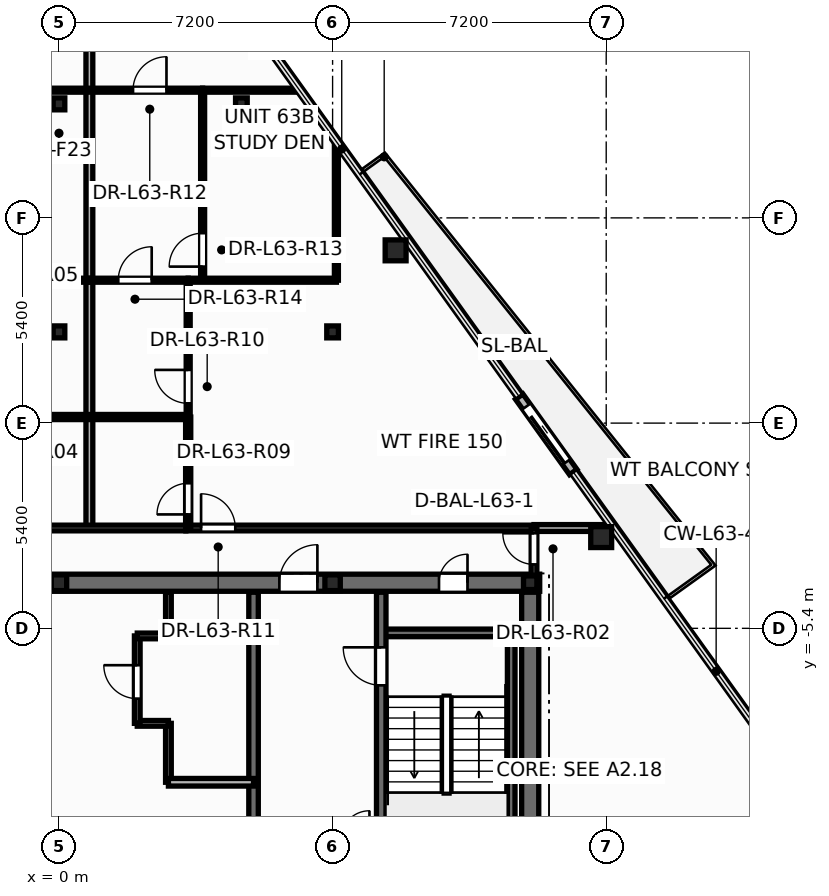
"""IFC4 building model, lengths in metres.
Left out: names, types, materials, properties, quantities, classifications, styles, units other than length and angle.
Written with IfcOpenShell. Run it as: python <this file> out.ifc"""

import sys

from ifc_helpers import new_model, si_unit, direction, frame, frame_2d, origin, origin_2d, place, context, subcontext, project, spatial, rectangle, hollow_circle, i_section, extrude, element, fill, save


model = new_model("IFC4")
c1 = context("Model", 3, precision=1e-05, world=origin(), true_north=direction((0.0, 1.0)))
c2 = subcontext(c1, "Body", "Model", "MODEL_VIEW")
j1 = project(units=[si_unit("LENGTHUNIT", "METRE"), si_unit("PLANEANGLEUNIT", "RADIAN")], contexts=[c1])
p1 = place(None, origin())
s1 = spatial("IfcSite", under=j1, at=p1, CompositionType="ELEMENT")
p2 = place(p1, origin())
s2 = spatial("IfcBuilding", under=s1, at=p2, CompositionType="ELEMENT")
p3 = place(p2, frame((0.0, 0.0, 240.6)))
s3 = spatial("IfcBuildingStorey", under=s2, at=p3, CompositionType="ELEMENT", Elevation=240.6)
for number, where, z_axis, x_axis in (
    (1, (14.268, -2.999, 0.0), (0.0, 0.0, 1.0), (1.0, 0.0, 0.0)),
    (2, (8.858, 4.546, 0.0), (0.0, 0.0, 1.0), (1.0, 0.0, 0.0)),
):
    element("IfcColumn", number, at=place(p3, frame(where, z_axis=z_axis, x_axis=x_axis)), inside=s3, PredefinedType="COLUMN", context=c2, shape_type="SweptSolid", body=[
        extrude(hollow_circle(Radius=0.275, WallThickness=0.024, at=origin_2d()), origin(), (0.0, 0.0, 1.0), 3.6),
    ])
p4 = place(p3, frame((12.4, -4.2, 0.0), z_axis=(0.0, 0.0, 1.0), x_axis=(1.0, 0.0, 0.0)))
e3 = element("IfcColumn", 3, at=p4, inside=s3, PredefinedType="COLUMN", context=c2, shape_type="SweptSolid", body=[
    extrude(i_section(OverallWidth=0.352, OverallDepth=0.359, WebThickness=0.018, FlangeThickness=0.026, at=origin_2d()), origin(), (0.0, 0.0, 1.0), 3.6),
])
for number, where, z_axis, x_axis in (
    (4, (0.0, -4.2, 0.0), (0.0, 0.0, 1.0), (1.0, 0.0, 0.0)),
    (5, (7.2, -4.2, 0.0), (0.0, 0.0, 1.0), (1.0, 0.0, 0.0)),
):
    element("IfcColumn", number, at=place(p3, frame(where, z_axis=z_axis, x_axis=x_axis)), inside=s3, PredefinedType="PILASTER", context=c2, shape_type="SweptSolid", body=[
        extrude(i_section(OverallWidth=0.405, OverallDepth=0.414, WebThickness=0.022, FlangeThickness=0.032, at=origin_2d()), origin(), (0.0, 0.0, 1.0), 3.6),
    ])
for number, where, z_axis, x_axis in (
    (6, (0.0, 2.4, 0.0), (0.0, 0.0, 1.0), (1.0, 0.0, 0.0)),
    (7, (7.2, 2.4, 0.0), (0.0, 0.0, 1.0), (1.0, 0.0, 0.0)),
    (8, (0.0, 8.4, 0.0), (0.0, 0.0, 1.0), (1.0, 0.0, 0.0)),
    (9, (4.8, 8.4, 0.0), (0.0, 0.0, 1.0), (1.0, 0.0, 0.0)),
):
    element("IfcColumn", number, at=place(p3, frame(where, z_axis=z_axis, x_axis=x_axis)), inside=s3, PredefinedType="COLUMN", context=c2, shape_type="SweptSolid", body=[
        extrude(i_section(OverallWidth=0.307, OverallDepth=0.314, WebThickness=0.012, FlangeThickness=0.019, at=origin_2d()), origin(), (0.0, 0.0, 1.0), 3.6),
    ])
p5 = place(p3, frame((13.532, -1.287, -0.015), z_axis=(0.0, 0.0, 1.0), x_axis=(-0.582666574714, 0.812711303423, 0.0)))
e10 = element("IfcWall", 10, at=p5, inside=s3, PredefinedType="STANDARD", context=c2, shape_type="SweptSolid", body=[
    extrude(rectangle(XDim=2.44, YDim=0.24, at=frame_2d((1.22, 0.0))), origin(), (0.0, 0.0, 1.0), 2.813),
])
p6 = place(p5, frame((0.32, 0.0, 0.015)))
e11 = element("IfcOpeningElement", 11, at=p6, cuts=e10, PredefinedType="OPENING", context=c2, shape_type="SweptSolid", body=[
    extrude(rectangle(XDim=1.806, YDim=2.204, at=frame_2d((0.9, 1.102))), frame((0.0, 0.13, 0.0), z_axis=(0.0, -1.0, 0.0), x_axis=(1.0, 0.0, 0.0)), (0.0, 0.0, 1.0), 0.26),
])
p7 = place(p3, frame((2.88, -9.45, 0.0), z_axis=(0.0, 0.0, 1.0), x_axis=(0.0, 1.0, 0.0)))
e12 = element("IfcWall", 12, at=p7, inside=s3, PredefinedType="PARTITIONING", context=c2, shape_type="SweptSolid", body=[
    extrude(rectangle(XDim=1.55, YDim=0.15, at=frame_2d((0.775, 0.0))), origin(), (0.0, 0.0, 1.0), 3.28),
])
p8 = place(p3, frame((2.06, -7.9, 0.0), z_axis=(0.0, 0.0, 1.0), x_axis=(1.0, 0.0, 0.0)))
e13 = element("IfcWall", 13, at=p8, inside=s3, PredefinedType="PARTITIONING", context=c2, shape_type="SweptSolid", body=[
    extrude(rectangle(XDim=0.82, YDim=0.15, at=frame_2d((0.41, 0.0))), origin(), (0.0, 0.0, 1.0), 3.28),
])
p9 = place(p3, frame((2.06, -7.9, 0.0), z_axis=(0.0, 0.0, 1.0), x_axis=(0.0, 1.0, 0.0)))
e14 = element("IfcWall", 14, at=p9, inside=s3, PredefinedType="PARTITIONING", context=c2, shape_type="SweptSolid", body=[
    extrude(rectangle(XDim=2.3, YDim=0.15, at=frame_2d((1.15, 0.0))), origin(), (0.0, 0.0, 1.0), 3.28),
])
p10 = place(p9, frame((0.65, 0.0, 0.0)))
e15 = element("IfcOpeningElement", 15, at=p10, cuts=e14, PredefinedType="OPENING", context=c2, shape_type="SweptSolid", body=[
    extrude(rectangle(XDim=0.886, YDim=2.104, at=frame_2d((0.44, 1.052))), frame((0.0, 0.085, 0.0), z_axis=(0.0, -1.0, 0.0), x_axis=(1.0, 0.0, 0.0)), (0.0, 0.0, 1.0), 0.17),
])
p11 = place(p3, frame((2.06, -5.6, 0.0), z_axis=(0.0, 0.0, 1.0), x_axis=(1.0, 0.0, 0.0)))
e16 = element("IfcWall", 16, at=p11, inside=s3, PredefinedType="PARTITIONING", context=c2, shape_type="SweptSolid", body=[
    extrude(rectangle(XDim=0.82, YDim=0.15, at=frame_2d((0.41, 0.0))), origin(), (0.0, 0.0, 1.0), 3.28),
])
p12 = place(p3, frame((2.88, -5.6, 0.0), z_axis=(0.0, 0.0, 1.0), x_axis=(0.0, 1.0, 0.0)))
e17 = element("IfcWall", 17, at=p12, inside=s3, PredefinedType="PARTITIONING", context=c2, shape_type="SweptSolid", body=[
    extrude(rectangle(XDim=1.15, YDim=0.15, at=frame_2d((0.575, 0.0))), origin(), (0.0, 0.0, 1.0), 3.28),
])
p13 = place(p3, frame((-12.65, -4.2, 0.0), z_axis=(0.0, 0.0, 1.0), x_axis=(1.0, 0.0, 0.0)))
e18 = element("IfcWall", 18, at=p13, inside=s3, PredefinedType="SHEAR", context=c2, shape_type="SweptSolid", body=[
    extrude(rectangle(XDim=25.3, YDim=0.45, at=frame_2d((12.65, 0.0))), origin(), (0.0, 0.0, 1.0), 3.6),
])
p14 = place(p13, frame((1.85, 0.0, 0.0)))
e19 = element("IfcOpeningElement", 19, at=p14, cuts=e18, PredefinedType="OPENING", context=c2, shape_type="SweptSolid", body=[
    extrude(rectangle(XDim=0.756, YDim=2.054, at=frame_2d((0.375, 1.027))), frame((0.0, 0.235, 0.0), z_axis=(0.0, -1.0, 0.0), x_axis=(1.0, 0.0, 0.0)), (0.0, 0.0, 1.0), 0.47),
])
p15 = place(p13, frame((22.65, 0.0, 0.0)))
e20 = element("IfcOpeningElement", 20, at=p15, cuts=e18, PredefinedType="OPENING", context=c2, shape_type="SweptSolid", body=[
    extrude(rectangle(XDim=0.756, YDim=2.054, at=frame_2d((0.375, 1.027))), frame((0.0, 0.235, 0.0), z_axis=(0.0, -1.0, 0.0), x_axis=(1.0, 0.0, 0.0)), (0.0, 0.0, 1.0), 0.47),
])
p16 = place(p13, frame((5.85, 0.0, 0.0)))
e21 = element("IfcOpeningElement", 21, at=p16, cuts=e18, PredefinedType="OPENING", context=c2, shape_type="SweptSolid", body=[
    extrude(rectangle(XDim=1.006, YDim=2.104, at=frame_2d((0.5, 1.052))), frame((0.0, 0.235, 0.0), z_axis=(0.0, -1.0, 0.0), x_axis=(1.0, 0.0, 0.0)), (0.0, 0.0, 1.0), 0.47),
])
p17 = place(p13, frame((10.35, 0.0, 0.0)))
e22 = element("IfcOpeningElement", 22, at=p17, cuts=e18, PredefinedType="OPENING", context=c2, shape_type="SweptSolid", body=[
    extrude(rectangle(XDim=1.406, YDim=2.154, at=frame_2d((0.7, 1.077))), frame((0.0, 0.235, 0.0), z_axis=(0.0, -1.0, 0.0), x_axis=(1.0, 0.0, 0.0)), (0.0, 0.0, 1.0), 0.47),
])
p18 = place(p13, frame((18.45, 0.0, 0.0)))
e23 = element("IfcOpeningElement", 23, at=p18, cuts=e18, PredefinedType="OPENING", context=c2, shape_type="SweptSolid", body=[
    extrude(rectangle(XDim=1.006, YDim=2.104, at=frame_2d((0.5, 1.052))), frame((0.0, 0.235, 0.0), z_axis=(0.0, -1.0, 0.0), x_axis=(1.0, 0.0, 0.0)), (0.0, 0.0, 1.0), 0.47),
])
p19 = place(p3, frame((8.48, -5.52, 0.0), z_axis=(0.0, 0.0, 1.0), x_axis=(1.0, 0.0, 0.0)))
e24 = element("IfcWall", 24, at=p19, inside=s3, PredefinedType="SOLIDWALL", context=c2, shape_type="SweptSolid", body=[
    extrude(rectangle(XDim=3.87, YDim=0.2, at=frame_2d((1.935, 0.0))), origin(), (0.0, 0.0, 1.0), 3.6),
])
p20 = place(p3, frame((11.9, -13.1, 0.0), z_axis=(0.0, 0.0, 1.0), x_axis=(0.0, 1.0, 0.0)))
e25 = element("IfcWall", 25, at=p20, inside=s3, PredefinedType="SOLIDWALL", context=c2, shape_type="SweptSolid", body=[
    extrude(rectangle(XDim=7.58, YDim=0.2, at=frame_2d((3.79, 0.0))), origin(), (0.0, 0.0, 1.0), 3.6),
])
p21 = place(p3, frame((8.48, -13.85, 0.0), z_axis=(0.0, 0.0, 1.0), x_axis=(0.0, 1.0, 0.0)))
e26 = element("IfcWall", 26, at=p21, inside=s3, PredefinedType="SHEAR", context=c2, shape_type="SweptSolid", body=[
    extrude(rectangle(XDim=9.4, YDim=0.25, at=frame_2d((4.7, 0.0))), origin(), (0.0, 0.0, 1.0), 3.6),
])
p22 = place(p21, frame((6.95, 0.0, 0.0)))
e27 = element("IfcOpeningElement", 27, at=p22, cuts=e26, PredefinedType="OPENING", context=c2, shape_type="SweptSolid", body=[
    extrude(rectangle(XDim=1.006, YDim=2.104, at=frame_2d((0.5, 1.052))), frame((0.0, 0.135, 0.0), z_axis=(0.0, -1.0, 0.0), x_axis=(1.0, 0.0, 0.0)), (0.0, 0.0, 1.0), 0.27),
])
p23 = place(p3, frame((5.12, -13.85, 0.0), z_axis=(0.0, 0.0, 1.0), x_axis=(0.0, 1.0, 0.0)))
e28 = element("IfcWall", 28, at=p23, inside=s3, PredefinedType="SHEAR", context=c2, shape_type="SweptSolid", body=[
    extrude(rectangle(XDim=9.4, YDim=0.25, at=frame_2d((4.7, 0.0))), origin(), (0.0, 0.0, 1.0), 3.6),
])
p24 = place(p3, frame((12.4, -13.85, 0.0), z_axis=(0.0, 0.0, 1.0), x_axis=(0.0, 1.0, 0.0)))
e29 = element("IfcWall", 29, at=p24, inside=s3, PredefinedType="SHEAR", context=c2, shape_type="SweptSolid", body=[
    extrude(rectangle(XDim=9.4, YDim=0.45, at=frame_2d((4.7, 0.0))), origin(), (0.0, 0.0, 1.0), 3.6),
])
p25 = place(p3, frame((2.88, -9.45, 0.0), z_axis=(0.0, 0.0, 1.0), x_axis=(1.0, 0.0, 0.0)))
e30 = element("IfcWall", 30, at=p25, inside=s3, PredefinedType="SOLIDWALL", context=c2, shape_type="SweptSolid", body=[
    extrude(rectangle(XDim=2.24, YDim=0.2, at=frame_2d((1.12, 0.0))), origin(), (0.0, 0.0, 1.0), 3.28),
])
p26 = place(p3, frame((3.34, -2.76, 0.0), z_axis=(0.0, 0.0, 1.0), x_axis=(1.0, 0.0, 0.0)))
e31 = element("IfcWall", 31, at=p26, inside=s3, PredefinedType="PARTITIONING", context=c2, shape_type="SweptSolid", body=[
    extrude(rectangle(XDim=9.16, YDim=0.15, at=frame_2d((4.58, 0.0))), origin(), (0.0, 0.0, 1.0), 2.255),
])
p27 = place(p26, frame((0.399, 0.0, 0.0)))
e32 = element("IfcOpeningElement", 32, at=p27, cuts=e31, PredefinedType="OPENING", context=c2, shape_type="SweptSolid", body=[
    extrude(rectangle(XDim=0.906, YDim=2.104, at=frame_2d((0.45, 1.052))), frame((0.0, 0.085, 0.0), z_axis=(0.0, -1.0, 0.0), x_axis=(1.0, 0.0, 0.0)), (0.0, 0.0, 1.0), 0.17),
])
p28 = place(p3, frame((-6.329, 8.76, 0.0), z_axis=(0.0, 0.0, 1.0), x_axis=(1.0, 0.0, 0.0)))
e33 = element("IfcWall", 33, at=p28, inside=s3, PredefinedType="PARTITIONING", context=c2, shape_type="SweptSolid", body=[
    extrude(rectangle(XDim=7.129, YDim=0.105, at=frame_2d((3.565, 0.0))), origin(), (0.0, 0.0, 1.0), 2.653),
])
p29 = place(p28, frame((3.49, 0.0, 0.0)))
e34 = element("IfcOpeningElement", 34, at=p29, cuts=e33, PredefinedType="OPENING", context=c2, shape_type="SweptSolid", body=[
    extrude(rectangle(XDim=0.886, YDim=2.104, at=frame_2d((0.44, 1.052))), frame((0.0, 0.062, 0.0), z_axis=(0.0, -1.0, 0.0), x_axis=(1.0, 0.0, 0.0)), (0.0, 0.0, 1.0), 0.125),
])
p30 = place(p3, frame((0.8, -2.76, 0.0), z_axis=(0.0, 0.0, 1.0), x_axis=(0.0, 1.0, 0.0)))
e35 = element("IfcWall", 35, at=p30, inside=s3, PredefinedType="PARTITIONING", context=c2, shape_type="SweptSolid", body=[
    extrude(rectangle(XDim=16.509, YDim=0.18, at=frame_2d((8.254, 0.0))), origin(), (0.0, 0.0, 1.0), 2.255),
])
p31 = place(p3, frame((3.78, 3.76, 0.0), z_axis=(0.0, 0.0, 1.0), x_axis=(0.0, 1.0, 0.0)))
e36 = element("IfcWall", 36, at=p31, inside=s3, PredefinedType="PARTITIONING", context=c2, shape_type="SweptSolid", body=[
    extrude(rectangle(XDim=5.0, YDim=0.105, at=frame_2d((2.5, 0.0))), origin(), (0.0, 0.0, 1.0), 2.653),
])
p32 = place(p31, frame((0.358, 0.0, 0.0)))
e37 = element("IfcOpeningElement", 37, at=p32, cuts=e36, PredefinedType="OPENING", context=c2, shape_type="SweptSolid", body=[
    extrude(rectangle(XDim=0.886, YDim=2.104, at=frame_2d((0.44, 1.052))), frame((0.0, 0.062, 0.0), z_axis=(0.0, -1.0, 0.0), x_axis=(1.0, 0.0, 0.0)), (0.0, 0.0, 1.0), 0.125),
])
p33 = place(p3, frame((7.3, 3.76, 0.0), z_axis=(0.0, 0.0, 1.0), x_axis=(0.0, 1.0, 0.0)))
e38 = element("IfcWall", 38, at=p33, inside=s3, PredefinedType="PARTITIONING", context=c2, shape_type="SweptSolid", body=[
    extrude(rectangle(XDim=3.646, YDim=0.105, at=frame_2d((1.823, 0.0))), origin(), (0.0, 0.0, 1.0), 2.653),
])
p34 = place(p3, frame((3.4, 0.16, 0.0), z_axis=(0.0, 0.0, 1.0), x_axis=(0.0, 1.0, 0.0)))
e39 = element("IfcWall", 39, at=p34, inside=s3, PredefinedType="PARTITIONING", context=c2, shape_type="SweptSolid", body=[
    extrude(rectangle(XDim=3.6, YDim=0.105, at=frame_2d((1.8, 0.0))), origin(), (0.0, 0.0, 1.0), 2.255),
])
p35 = place(p34, frame((0.36, 0.0, 0.0)))
e40 = element("IfcOpeningElement", 40, at=p35, cuts=e39, PredefinedType="OPENING", context=c2, shape_type="SweptSolid", body=[
    extrude(rectangle(XDim=0.886, YDim=2.104, at=frame_2d((0.44, 1.052))), frame((0.0, 0.062, 0.0), z_axis=(0.0, -1.0, 0.0), x_axis=(1.0, 0.0, 0.0)), (0.0, 0.0, 1.0), 0.125),
])
p36 = place(p3, frame((3.4, 3.76, 0.0), z_axis=(0.0, 0.0, 1.0), x_axis=(1.0, 0.0, 0.0)))
e41 = element("IfcWall", 41, at=p36, inside=s3, PredefinedType="PARTITIONING", context=c2, shape_type="SweptSolid", body=[
    extrude(rectangle(XDim=3.9, YDim=0.105, at=frame_2d((1.95, 0.0))), origin(), (0.0, 0.0, 1.0), 2.653),
])
p37 = place(p3, frame((0.8, 8.76, 0.0), z_axis=(0.0, 0.0, 1.0), x_axis=(1.0, 0.0, 0.0)))
e42 = element("IfcWall", 42, at=p37, inside=s3, PredefinedType="PARTITIONING", context=c2, shape_type="SweptSolid", body=[
    extrude(rectangle(XDim=2.98, YDim=0.105, at=frame_2d((1.49, 0.0))), origin(), (0.0, 0.0, 1.0), 3.28),
])
p38 = place(p37, frame((1.149, 0.0, 0.0)))
e43 = element("IfcOpeningElement", 43, at=p38, cuts=e42, PredefinedType="OPENING", context=c2, shape_type="SweptSolid", body=[
    extrude(rectangle(XDim=0.886, YDim=2.104, at=frame_2d((0.44, 1.052))), frame((0.0, 0.062, 0.0), z_axis=(0.0, -1.0, 0.0), x_axis=(1.0, 0.0, 0.0)), (0.0, 0.0, 1.0), 0.125),
])
p39 = place(p3, frame((3.4, -2.76, 0.0), z_axis=(0.0, 0.0, 1.0), x_axis=(0.0, 1.0, 0.0)))
e44 = element("IfcWall", 44, at=p39, inside=s3, PredefinedType="PARTITIONING", context=c2, shape_type="SweptSolid", body=[
    extrude(rectangle(XDim=2.92, YDim=0.135, at=frame_2d((1.46, 0.0))), origin(), (0.0, 0.0, 1.0), 3.28),
])
p40 = place(p39, frame((0.357, 0.0, 0.0)))
e45 = element("IfcOpeningElement", 45, at=p40, cuts=e44, PredefinedType="OPENING", context=c2, shape_type="SweptSolid", body=[
    extrude(rectangle(XDim=0.826, YDim=2.104, at=frame_2d((0.41, 1.052))), frame((0.0, 0.078, 0.0), z_axis=(0.0, -1.0, 0.0), x_axis=(1.0, 0.0, 0.0)), (0.0, 0.0, 1.0), 0.155),
])
p41 = place(p3, frame((-1.438, -2.76, 0.0), z_axis=(0.0, 0.0, 1.0), x_axis=(1.0, 0.0, 0.0)))
e46 = element("IfcWall", 46, at=p41, inside=s3, PredefinedType="PARTITIONING", context=c2, shape_type="SweptSolid", body=[
    extrude(rectangle(XDim=4.776, YDim=0.15, at=frame_2d((2.388, 0.0))), origin(), (0.0, 0.0, 1.0), 2.255),
])
p42 = place(p3, frame((-1.5, 0.16, 0.0), z_axis=(0.0, 0.0, 1.0), x_axis=(1.0, 0.0, 0.0)))
e47 = element("IfcWall", 47, at=p42, inside=s3, PredefinedType="PARTITIONING", context=c2, shape_type="SweptSolid", body=[
    extrude(rectangle(XDim=4.9, YDim=0.135, at=frame_2d((2.45, 0.0))), origin(), (0.0, 0.0, 1.0), 2.255),
])
p43 = place(p3, frame((0.8, 3.76, 0.0), z_axis=(0.0, 0.0, 1.0), x_axis=(1.0, 0.0, 0.0)))
e48 = element("IfcWall", 48, at=p43, inside=s3, PredefinedType="PARTITIONING", context=c2, shape_type="SweptSolid", body=[
    extrude(rectangle(XDim=2.6, YDim=0.105, at=frame_2d((1.3, 0.0))), origin(), (0.0, 0.0, 1.0), 2.899),
])
p44 = place(p43, frame((0.76, 0.0, 0.0)))
e49 = element("IfcOpeningElement", 49, at=p44, cuts=e48, PredefinedType="OPENING", context=c2, shape_type="SweptSolid", body=[
    extrude(rectangle(XDim=0.886, YDim=2.104, at=frame_2d((0.44, 1.052))), frame((0.0, 0.062, 0.0), z_axis=(0.0, -1.0, 0.0), x_axis=(1.0, 0.0, 0.0)), (0.0, 0.0, 1.0), 0.125),
])
p45 = place(p3, frame((3.78, 8.76, 0.0), z_axis=(0.0, 0.0, 1.0), x_axis=(1.0, 0.0, 0.0)))
e50 = element("IfcWall", 50, at=p45, inside=s3, PredefinedType="PARTITIONING", context=c2, shape_type="SweptSolid", body=[
    extrude(rectangle(XDim=2.549, YDim=0.105, at=frame_2d((1.275, 0.0))), origin(), (0.0, 0.0, 1.0), 2.653),
])
p46 = place(p3, frame((-1.5, 3.76, 0.0), z_axis=(0.0, 0.0, 1.0), x_axis=(1.0, 0.0, 0.0)))
e51 = element("IfcWall", 51, at=p46, inside=s3, PredefinedType="PARTITIONING", context=c2, shape_type="SweptSolid", body=[
    extrude(rectangle(XDim=2.3, YDim=0.105, at=frame_2d((1.15, 0.0))), origin(), (0.0, 0.0, 1.0), 2.255),
])
p47 = place(p3, frame((12.5, -2.76, 0.0), z_axis=(0.0, 0.0, 1.0), x_axis=(1.0, 0.0, 0.0)))
e52 = element("IfcWall", 52, at=p47, inside=s3, PredefinedType="PARTITIONING", context=c2, shape_type="SweptSolid", body=[
    extrude(rectangle(XDim=2.088, YDim=0.18, at=frame_2d((1.044, 0.0))), origin(), (0.0, 0.0, 1.0), 2.653),
])
p48 = place(p3, frame((12.5, -4.24, 0.0), z_axis=(0.0, 0.0, 1.0), x_axis=(0.0, 1.0, 0.0)))
e53 = element("IfcWall", 53, at=p48, inside=s3, PredefinedType="PARTITIONING", context=c2, shape_type="SweptSolid", body=[
    extrude(rectangle(XDim=1.48, YDim=0.15, at=frame_2d((0.74, 0.0))), origin(), (0.0, 0.0, 1.0), 2.255),
])
p49 = place(p48, frame((0.522, 0.0, 0.0)))
e54 = element("IfcOpeningElement", 54, at=p49, cuts=e53, PredefinedType="OPENING", context=c2, shape_type="SweptSolid", body=[
    extrude(rectangle(XDim=0.826, YDim=2.104, at=frame_2d((0.41, 1.052))), frame((0.0, 0.085, 0.0), z_axis=(0.0, -1.0, 0.0), x_axis=(1.0, 0.0, 0.0)), (0.0, 0.0, 1.0), 0.17),
])
p50 = place(p6, origin())
e55 = element("IfcDoor", 55, at=p50, inside=s3, OperationType="SLIDING_TO_LEFT", PredefinedType="DOOR", context=c2, shape_type="SweptSolid", body=[
    extrude(rectangle(XDim=1.8, YDim=2.2, at=frame_2d((0.9, 1.1))), frame((0.0, 0.025, 0.0), z_axis=(0.0, -1.0, 0.0), x_axis=(1.0, 0.0, 0.0)), (0.0, 0.0, 1.0), 0.05),
])
fill(e11, e55)
p51 = place(p10, origin())
e56 = element("IfcDoor", 56, at=p51, inside=s3, OperationType="SINGLE_SWING_RIGHT", PredefinedType="DOOR", context=c2, shape_type="SweptSolid", body=[
    extrude(rectangle(XDim=0.88, YDim=2.1, at=frame_2d((0.44, 1.05))), frame((0.0, 0.025, 0.0), z_axis=(0.0, -1.0, 0.0), x_axis=(1.0, 0.0, 0.0)), (0.0, 0.0, 1.0), 0.05),
])
fill(e15, e56)
p52 = place(p22, origin())
e57 = element("IfcDoor", 57, at=p52, inside=s3, OperationType="SINGLE_SWING_RIGHT", PredefinedType="DOOR", context=c2, shape_type="SweptSolid", body=[
    extrude(rectangle(XDim=1.0, YDim=2.1, at=frame_2d((0.5, 1.05))), frame((0.0, 0.025, 0.0), z_axis=(0.0, -1.0, 0.0), x_axis=(1.0, 0.0, 0.0)), (0.0, 0.0, 1.0), 0.05),
])
fill(e27, e57)
p53 = place(p15, origin())
e58 = element("IfcDoor", 58, at=p53, inside=s3, OperationType="SINGLE_SWING_RIGHT", PredefinedType="DOOR", context=c2, shape_type="SweptSolid", body=[
    extrude(rectangle(XDim=0.75, YDim=2.05, at=frame_2d((0.375, 1.025))), frame((0.0, 0.025, 0.0), z_axis=(0.0, -1.0, 0.0), x_axis=(1.0, 0.0, 0.0)), (0.0, 0.0, 1.0), 0.05),
])
fill(e20, e58)
p54 = place(p18, origin())
e59 = element("IfcDoor", 59, at=p54, inside=s3, OperationType="SINGLE_SWING_RIGHT", PredefinedType="DOOR", context=c2, shape_type="SweptSolid", body=[
    extrude(rectangle(XDim=1.0, YDim=2.1, at=frame_2d((0.5, 1.05))), frame((0.0, 0.025, 0.0), z_axis=(0.0, -1.0, 0.0), x_axis=(1.0, 0.0, 0.0)), (0.0, 0.0, 1.0), 0.05),
])
fill(e23, e59)
p55 = place(p49, origin())
e60 = element("IfcDoor", 60, at=p55, inside=s3, OperationType="SINGLE_SWING_RIGHT", PredefinedType="DOOR", context=c2, shape_type="SweptSolid", body=[
    extrude(rectangle(XDim=0.82, YDim=2.1, at=frame_2d((0.41, 1.05))), frame((0.0, 0.025, 0.0), z_axis=(0.0, -1.0, 0.0), x_axis=(1.0, 0.0, 0.0)), (0.0, 0.0, 1.0), 0.05),
])
fill(e54, e60)
p56 = place(p40, origin())
e61 = element("IfcDoor", 61, at=p56, inside=s3, OperationType="SINGLE_SWING_LEFT", PredefinedType="DOOR", context=c2, shape_type="SweptSolid", body=[
    extrude(rectangle(XDim=0.82, YDim=2.1, at=frame_2d((0.41, 1.05))), frame((0.0, 0.025, 0.0), z_axis=(0.0, -1.0, 0.0), x_axis=(1.0, 0.0, 0.0)), (0.0, 0.0, 1.0), 0.05),
])
fill(e45, e61)
p57 = place(p35, origin())
e62 = element("IfcDoor", 62, at=p57, inside=s3, OperationType="SINGLE_SWING_RIGHT", PredefinedType="DOOR", context=c2, shape_type="SweptSolid", body=[
    extrude(rectangle(XDim=0.88, YDim=2.1, at=frame_2d((0.44, 1.05))), frame((0.0, 0.025, 0.0), z_axis=(0.0, -1.0, 0.0), x_axis=(1.0, 0.0, 0.0)), (0.0, 0.0, 1.0), 0.05),
])
fill(e40, e62)
p58 = place(p27, origin())
e63 = element("IfcDoor", 63, at=p58, inside=s3, OperationType="SINGLE_SWING_LEFT", PredefinedType="DOOR", context=c2, shape_type="SweptSolid", body=[
    extrude(rectangle(XDim=0.9, YDim=2.1, at=frame_2d((0.45, 1.05))), frame((0.0, 0.025, 0.0), z_axis=(0.0, -1.0, 0.0), x_axis=(1.0, 0.0, 0.0)), (0.0, 0.0, 1.0), 0.05),
])
fill(e32, e63)
p59 = place(p38, origin())
e64 = element("IfcDoor", 64, at=p59, inside=s3, OperationType="SINGLE_SWING_RIGHT", PredefinedType="DOOR", context=c2, shape_type="SweptSolid", body=[
    extrude(rectangle(XDim=0.88, YDim=2.1, at=frame_2d((0.44, 1.05))), frame((0.0, 0.025, 0.0), z_axis=(0.0, -1.0, 0.0), x_axis=(1.0, 0.0, 0.0)), (0.0, 0.0, 1.0), 0.05),
])
fill(e43, e64)
p60 = place(p32, origin())
e65 = element("IfcDoor", 65, at=p60, inside=s3, OperationType="SINGLE_SWING_LEFT", PredefinedType="DOOR", context=c2, shape_type="SweptSolid", body=[
    extrude(rectangle(XDim=0.88, YDim=2.1, at=frame_2d((0.44, 1.05))), frame((0.0, 0.025, 0.0), z_axis=(0.0, -1.0, 0.0), x_axis=(1.0, 0.0, 0.0)), (0.0, 0.0, 1.0), 0.05),
])
fill(e37, e65)
p61 = place(p44, origin())
e66 = element("IfcDoor", 66, at=p61, inside=s3, OperationType="SINGLE_SWING_RIGHT", PredefinedType="DOOR", context=c2, shape_type="SweptSolid", body=[
    extrude(rectangle(XDim=0.88, YDim=2.1, at=frame_2d((0.44, 1.05))), frame((0.0, 0.025, 0.0), z_axis=(0.0, -1.0, 0.0), x_axis=(1.0, 0.0, 0.0)), (0.0, 0.0, 1.0), 0.05),
])
fill(e49, e66)
save(model, sys.argv[1])
